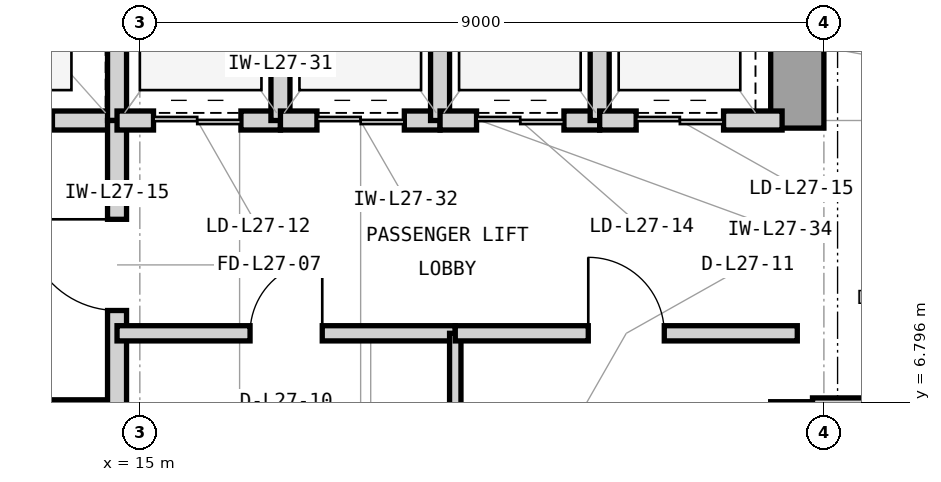
"""IFC4 building model, lengths in metres.
Left out: names, types, materials, properties, quantities, classifications, styles, units other than length and angle.
Written with IfcOpenShell. Run it as: python <this file> out.ifc"""

import sys

from ifc_helpers import new_model, si_unit, direction, frame, frame_2d, origin, place, context, subcontext, project, spatial, rectangle, extrude, element, fill, save


model = new_model("IFC4")
c1 = context("Model", 3, precision=1e-05, world=origin(), true_north=direction((0.0, 1.0)))
c2 = subcontext(c1, "Body", "Model", "MODEL_VIEW")
j1 = project(units=[si_unit("LENGTHUNIT", "METRE"), si_unit("PLANEANGLEUNIT", "RADIAN")], contexts=[c1])
p1 = place(None, origin())
s1 = spatial("IfcSite", under=j1, at=p1, CompositionType="ELEMENT")
p2 = place(p1, origin())
s2 = spatial("IfcBuilding", under=s1, at=p2, CompositionType="ELEMENT")
p3 = place(p2, frame((0.0, 0.0, 116.7)))
s3 = spatial("IfcBuildingStorey", under=s2, at=p3, CompositionType="ELEMENT", Elevation=116.7)
p4 = place(p3, frame((23.65, 10.4, 0.0), z_axis=(0.0, 0.0, 1.0), x_axis=(0.0, 1.0, 0.0)))
e1 = element("IfcWall", 1, at=p4, inside=s3, PredefinedType="SHEAR", context=c2, shape_type="SweptSolid", body=[
    extrude(rectangle(XDim=3.2, YDim=0.7, at=frame_2d((1.6, 0.0))), origin(), (0.0, 0.0, 1.0), 3.9),
])
p5 = place(p3, frame((11.82, 6.7, 0.0), z_axis=(0.0, 0.0, 1.0), x_axis=(1.0, 0.0, 0.0)))
e2 = element("IfcWall", 2, at=p5, inside=s3, PredefinedType="PARTITIONING", context=c2, shape_type="SweptSolid", body=[
    extrude(rectangle(XDim=2.88, YDim=0.25, at=frame_2d((1.44, 0.0))), origin(), (0.0, 0.0, 1.0), 3.227),
])
p6 = place(p5, frame((0.85, 0.0, 0.0)))
e3 = element("IfcOpeningElement", 3, at=p6, cuts=e2, PredefinedType="OPENING", context=c2, shape_type="SweptSolid", body=[
    extrude(rectangle(XDim=1.1, YDim=2.25, at=frame_2d((0.55, 1.125))), frame((0.0, 0.135, 0.0), z_axis=(0.0, -1.0, 0.0), x_axis=(1.0, 0.0, 0.0)), (0.0, 0.0, 1.0), 0.27),
])
p7 = place(p3, frame((11.95, 10.5, 0.0), z_axis=(0.0, 0.0, 1.0), x_axis=(1.0, 0.0, 0.0)))
e4 = element("IfcWall", 4, at=p7, inside=s3, PredefinedType="PARTITIONING", context=c2, shape_type="SweptSolid", body=[
    extrude(rectangle(XDim=2.75, YDim=0.25, at=frame_2d((1.375, 0.0))), origin(), (0.0, 0.0, 1.0), 3.227),
])
p8 = place(p7, frame((0.8, 0.0, 0.0)))
e5 = element("IfcOpeningElement", 5, at=p8, cuts=e4, PredefinedType="OPENING", context=c2, shape_type="SweptSolid", body=[
    extrude(rectangle(XDim=1.1, YDim=2.25, at=frame_2d((0.55, 1.125))), frame((0.0, 0.135, 0.0), z_axis=(0.0, -1.0, 0.0), x_axis=(1.0, 0.0, 0.0)), (0.0, 0.0, 1.0), 0.27),
])
p9 = place(p3, frame((14.7, 10.5, 0.0), z_axis=(0.0, 0.0, 1.0), x_axis=(0.0, 1.0, 0.0)))
e6 = element("IfcWall", 6, at=p9, inside=s3, PredefinedType="PARTITIONING", context=c2, shape_type="SweptSolid", body=[
    extrude(rectangle(XDim=3.0, YDim=0.25, at=frame_2d((1.5, 0.0))), origin(), (0.0, 0.0, 1.0), 3.69),
])
p10 = place(p3, frame((14.7, 6.7, 0.0), z_axis=(0.0, 0.0, 1.0), x_axis=(0.0, 1.0, 0.0)))
e7 = element("IfcWall", 7, at=p10, inside=s3, PredefinedType="PARTITIONING", context=c2, shape_type="SweptSolid", body=[
    extrude(rectangle(XDim=3.8, YDim=0.25, at=frame_2d((1.9, 0.0))), origin(), (0.0, 0.0, 1.0), 3.69),
])
p11 = place(p10, frame((1.3, 0.0, 0.0)))
e8 = element("IfcOpeningElement", 8, at=p11, cuts=e7, PredefinedType="OPENING", context=c2, shape_type="SweptSolid", body=[
    extrude(rectangle(XDim=1.2, YDim=2.2, at=frame_2d((0.6, 1.1))), frame((0.0, 0.135, 0.0), z_axis=(0.0, -1.0, 0.0), x_axis=(1.0, 0.0, 0.0)), (0.0, 0.0, 1.0), 0.27),
])
p12 = place(p3, frame((14.7, 7.7, 0.0), z_axis=(0.0, 0.0, 1.0), x_axis=(1.0, 0.0, 0.0)))
e9 = element("IfcWall", 9, at=p12, inside=s3, PredefinedType="PARTITIONING", context=c2, shape_type="SweptSolid", body=[
    extrude(rectangle(XDim=4.45, YDim=0.2, at=frame_2d((2.225, 0.0))), origin(), (0.0, 0.0, 1.0), 3.69),
])
p13 = place(p12, frame((1.75, 0.0, 0.0)))
e10 = element("IfcOpeningElement", 10, at=p13, cuts=e9, PredefinedType="OPENING", context=c2, shape_type="SweptSolid", body=[
    extrude(rectangle(XDim=0.95, YDim=2.1, at=frame_2d((0.475, 1.05))), frame((0.0, 0.11, 0.0), z_axis=(0.0, -1.0, 0.0), x_axis=(1.0, 0.0, 0.0)), (0.0, 0.0, 1.0), 0.22),
])
p14 = place(p3, frame((19.15, 3.35, 0.0), z_axis=(0.0, 0.0, 1.0), x_axis=(0.0, 1.0, 0.0)))
e11 = element("IfcWall", 11, at=p14, inside=s3, PredefinedType="PARTITIONING", context=c2, shape_type="SweptSolid", body=[
    extrude(rectangle(XDim=4.35, YDim=0.15, at=frame_2d((2.175, 0.0))), origin(), (0.0, 0.0, 1.0), 3.69),
])
p15 = place(p3, frame((19.15, 7.7, 0.0), z_axis=(0.0, 0.0, 1.0), x_axis=(1.0, 0.0, 0.0)))
e12 = element("IfcWall", 12, at=p15, inside=s3, PredefinedType="PARTITIONING", context=c2, shape_type="SweptSolid", body=[
    extrude(rectangle(XDim=4.5, YDim=0.2, at=frame_2d((2.25, 0.0))), origin(), (0.0, 0.0, 1.0), 3.69),
])
p16 = place(p15, frame((1.75, 0.0, 0.0)))
e13 = element("IfcOpeningElement", 13, at=p16, cuts=e12, PredefinedType="OPENING", context=c2, shape_type="SweptSolid", body=[
    extrude(rectangle(XDim=1.0, YDim=2.15, at=frame_2d((0.5, 1.075))), frame((0.0, 0.11, 0.0), z_axis=(0.0, -1.0, 0.0), x_axis=(1.0, 0.0, 0.0)), (0.0, 0.0, 1.0), 0.22),
])
p17 = place(p3, frame((14.7, 10.5, 0.0), z_axis=(0.0, 0.0, 1.0), x_axis=(1.0, 0.0, 0.0)))
e14 = element("IfcWall", 14, at=p17, inside=s3, PredefinedType="PARTITIONING", context=c2, shape_type="SweptSolid", body=[
    extrude(rectangle(XDim=2.15, YDim=0.25, at=frame_2d((1.075, 0.0))), origin(), (0.0, 0.0, 1.0), 3.227),
])
p18 = place(p17, frame((0.48, 0.0, 0.0)))
e15 = element("IfcOpeningElement", 15, at=p18, cuts=e14, PredefinedType="OPENING", context=c2, shape_type="SweptSolid", body=[
    extrude(rectangle(XDim=1.15, YDim=2.25, at=frame_2d((0.575, 1.125))), frame((0.0, 0.135, 0.0), z_axis=(0.0, -1.0, 0.0), x_axis=(1.0, 0.0, 0.0)), (0.0, 0.0, 1.0), 0.27),
])
p19 = place(p3, frame((16.85, 10.5, 0.0), z_axis=(0.0, 0.0, 1.0), x_axis=(0.0, 1.0, 0.0)))
e16 = element("IfcWall", 16, at=p19, inside=s3, PredefinedType="PARTITIONING", context=c2, shape_type="SweptSolid", body=[
    extrude(rectangle(XDim=3.0, YDim=0.25, at=frame_2d((1.5, 0.0))), origin(), (0.0, 0.0, 1.0), 3.69),
])
p20 = place(p3, frame((16.85, 10.5, 0.0), z_axis=(0.0, 0.0, 1.0), x_axis=(1.0, 0.0, 0.0)))
e17 = element("IfcWall", 17, at=p20, inside=s3, PredefinedType="PARTITIONING", context=c2, shape_type="SweptSolid", body=[
    extrude(rectangle(XDim=2.1, YDim=0.25, at=frame_2d((1.05, 0.0))), origin(), (0.0, 0.0, 1.0), 3.227),
])
p21 = place(p20, frame((0.48, 0.0, 0.0)))
e18 = element("IfcOpeningElement", 18, at=p21, cuts=e17, PredefinedType="OPENING", context=c2, shape_type="SweptSolid", body=[
    extrude(rectangle(XDim=1.15, YDim=2.25, at=frame_2d((0.575, 1.125))), frame((0.0, 0.135, 0.0), z_axis=(0.0, -1.0, 0.0), x_axis=(1.0, 0.0, 0.0)), (0.0, 0.0, 1.0), 0.27),
])
p22 = place(p3, frame((18.95, 10.5, 0.0), z_axis=(0.0, 0.0, 1.0), x_axis=(0.0, 1.0, 0.0)))
e19 = element("IfcWall", 19, at=p22, inside=s3, PredefinedType="PARTITIONING", context=c2, shape_type="SweptSolid", body=[
    extrude(rectangle(XDim=3.0, YDim=0.25, at=frame_2d((1.5, 0.0))), origin(), (0.0, 0.0, 1.0), 3.69),
])
p23 = place(p3, frame((18.95, 10.5, 0.0), z_axis=(0.0, 0.0, 1.0), x_axis=(1.0, 0.0, 0.0)))
e20 = element("IfcWall", 20, at=p23, inside=s3, PredefinedType="PARTITIONING", context=c2, shape_type="SweptSolid", body=[
    extrude(rectangle(XDim=2.1, YDim=0.25, at=frame_2d((1.05, 0.0))), origin(), (0.0, 0.0, 1.0), 3.227),
])
p24 = place(p23, frame((0.48, 0.0, 0.0)))
e21 = element("IfcOpeningElement", 21, at=p24, cuts=e20, PredefinedType="OPENING", context=c2, shape_type="SweptSolid", body=[
    extrude(rectangle(XDim=1.15, YDim=2.25, at=frame_2d((0.575, 1.125))), frame((0.0, 0.135, 0.0), z_axis=(0.0, -1.0, 0.0), x_axis=(1.0, 0.0, 0.0)), (0.0, 0.0, 1.0), 0.27),
])
p25 = place(p3, frame((21.05, 10.5, 0.0), z_axis=(0.0, 0.0, 1.0), x_axis=(0.0, 1.0, 0.0)))
e22 = element("IfcWall", 22, at=p25, inside=s3, PredefinedType="PARTITIONING", context=c2, shape_type="SweptSolid", body=[
    extrude(rectangle(XDim=3.0, YDim=0.25, at=frame_2d((1.5, 0.0))), origin(), (0.0, 0.0, 1.0), 3.69),
])
p26 = place(p3, frame((21.05, 10.5, 0.0), z_axis=(0.0, 0.0, 1.0), x_axis=(1.0, 0.0, 0.0)))
e23 = element("IfcWall", 23, at=p26, inside=s3, PredefinedType="PARTITIONING", context=c2, shape_type="SweptSolid", body=[
    extrude(rectangle(XDim=2.4, YDim=0.25, at=frame_2d((1.2, 0.0))), origin(), (0.0, 0.0, 1.0), 3.227),
])
p27 = place(p26, frame((0.48, 0.0, 0.0)))
e24 = element("IfcOpeningElement", 24, at=p27, cuts=e23, PredefinedType="OPENING", context=c2, shape_type="SweptSolid", body=[
    extrude(rectangle(XDim=1.15, YDim=2.25, at=frame_2d((0.575, 1.125))), frame((0.0, 0.135, 0.0), z_axis=(0.0, -1.0, 0.0), x_axis=(1.0, 0.0, 0.0)), (0.0, 0.0, 1.0), 0.27),
])
p28 = place(p3, frame((23.85, 6.75, 0.0), z_axis=(0.0, 0.0, 1.0), x_axis=(1.0, 0.0, 0.0)))
e25 = element("IfcWall", 25, at=p28, inside=s3, PredefinedType="PARTITIONING", context=c2, shape_type="SweptSolid", body=[
    extrude(rectangle(XDim=2.85, YDim=0.2, at=frame_2d((1.425, 0.0))), origin(), (0.0, 0.0, 1.0), 3.69),
])
p29 = place(p28, frame((0.7, 0.0, 0.0)))
e26 = element("IfcOpeningElement", 26, at=p29, cuts=e25, PredefinedType="OPENING", context=c2, shape_type="SweptSolid", body=[
    extrude(rectangle(XDim=1.0, YDim=2.15, at=frame_2d((0.5, 1.075))), frame((0.0, 0.11, 0.0), z_axis=(0.0, -1.0, 0.0), x_axis=(1.0, 0.0, 0.0)), (0.0, 0.0, 1.0), 0.22),
])
p30 = place(p11, origin())
e27 = element("IfcDoor", 27, at=p30, inside=s3, OperationType="SINGLE_SWING_RIGHT", PredefinedType="DOOR", context=c2, shape_type="SweptSolid", body=[
    extrude(rectangle(XDim=1.2, YDim=2.2, at=frame_2d((0.6, 1.1))), frame((0.0, 0.025, 0.0), z_axis=(0.0, -1.0, 0.0), x_axis=(1.0, 0.0, 0.0)), (0.0, 0.0, 1.0), 0.05),
])
fill(e8, e27)
p31 = place(p13, origin())
e28 = element("IfcDoor", 28, at=p31, inside=s3, OperationType="SINGLE_SWING_RIGHT", PredefinedType="DOOR", context=c2, shape_type="SweptSolid", body=[
    extrude(rectangle(XDim=0.95, YDim=2.1, at=frame_2d((0.475, 1.05))), frame((0.0, 0.025, 0.0), z_axis=(0.0, -1.0, 0.0), x_axis=(1.0, 0.0, 0.0)), (0.0, 0.0, 1.0), 0.05),
])
fill(e10, e28)
p32 = place(p16, origin())
e29 = element("IfcDoor", 29, at=p32, inside=s3, OperationType="SINGLE_SWING_LEFT", PredefinedType="DOOR", context=c2, shape_type="SweptSolid", body=[
    extrude(rectangle(XDim=1.0, YDim=2.15, at=frame_2d((0.5, 1.075))), frame((0.0, 0.025, 0.0), z_axis=(0.0, -1.0, 0.0), x_axis=(1.0, 0.0, 0.0)), (0.0, 0.0, 1.0), 0.05),
])
fill(e13, e29)
p33 = place(p18, origin())
e30 = element("IfcDoor", 30, at=p33, inside=s3, OperationType="DOUBLE_DOOR_SLIDING", PredefinedType="DOOR", context=c2, shape_type="SweptSolid", body=[
    extrude(rectangle(XDim=1.15, YDim=2.25, at=frame_2d((0.575, 1.125))), frame((0.0, 0.025, 0.0), z_axis=(0.0, -1.0, 0.0), x_axis=(1.0, 0.0, 0.0)), (0.0, 0.0, 1.0), 0.05),
])
fill(e15, e30)
p34 = place(p21, origin())
e31 = element("IfcDoor", 31, at=p34, inside=s3, OperationType="DOUBLE_DOOR_SLIDING", PredefinedType="DOOR", context=c2, shape_type="SweptSolid", body=[
    extrude(rectangle(XDim=1.15, YDim=2.25, at=frame_2d((0.575, 1.125))), frame((0.0, 0.025, 0.0), z_axis=(0.0, -1.0, 0.0), x_axis=(1.0, 0.0, 0.0)), (0.0, 0.0, 1.0), 0.05),
])
fill(e18, e31)
p35 = place(p24, origin())
e32 = element("IfcDoor", 32, at=p35, inside=s3, OperationType="DOUBLE_DOOR_SLIDING", PredefinedType="DOOR", context=c2, shape_type="SweptSolid", body=[
    extrude(rectangle(XDim=1.15, YDim=2.25, at=frame_2d((0.575, 1.125))), frame((0.0, 0.025, 0.0), z_axis=(0.0, -1.0, 0.0), x_axis=(1.0, 0.0, 0.0)), (0.0, 0.0, 1.0), 0.05),
])
fill(e21, e32)
p36 = place(p27, origin())
e33 = element("IfcDoor", 33, at=p36, inside=s3, OperationType="DOUBLE_DOOR_SLIDING", PredefinedType="DOOR", context=c2, shape_type="SweptSolid", body=[
    extrude(rectangle(XDim=1.15, YDim=2.25, at=frame_2d((0.575, 1.125))), frame((0.0, 0.025, 0.0), z_axis=(0.0, -1.0, 0.0), x_axis=(1.0, 0.0, 0.0)), (0.0, 0.0, 1.0), 0.05),
])
fill(e24, e33)
save(model, sys.argv[1])
